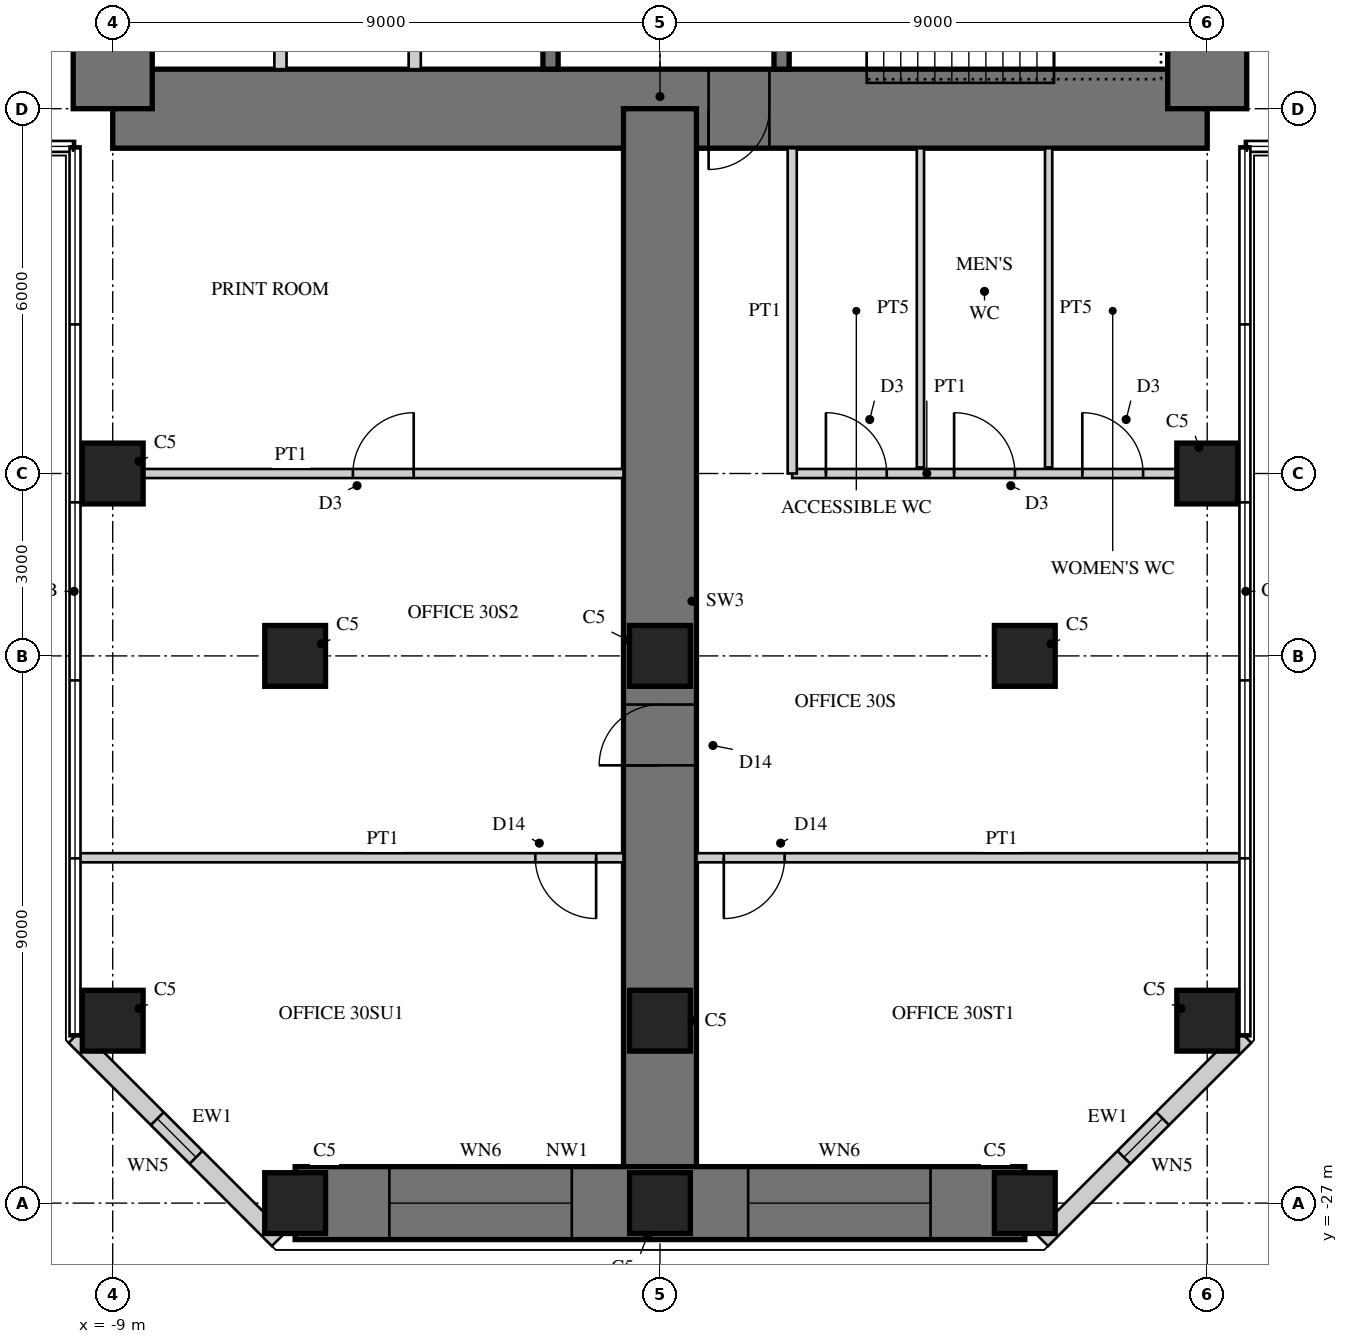
"""IFC4 building model, lengths in metres.
Left out: names, types, materials, properties, quantities, classifications, styles, units other than length and angle.
Written with IfcOpenShell. Run it as: python <this file> out.ifc"""

import sys

from ifc_helpers import new_model, si_unit, direction, frame, frame_2d, origin, origin_2d, place, context, subcontext, project, spatial, rectangle, hollow_rectangle, extrude, element, fill, save


model = new_model("IFC4")
c1 = context("Model", 3, precision=1e-05, world=origin(), true_north=direction((0.0, 1.0)))
c2 = subcontext(c1, "Body", "Model", "MODEL_VIEW")
j1 = project(units=[si_unit("LENGTHUNIT", "METRE"), si_unit("PLANEANGLEUNIT", "RADIAN")], contexts=[c1])
p1 = place(None, origin())
s1 = spatial("IfcSite", under=j1, at=p1, CompositionType="ELEMENT")
p2 = place(p1, origin())
s2 = spatial("IfcBuilding", under=s1, at=p2, CompositionType="ELEMENT")
p3 = place(p2, frame((0.0, 0.0, 124.5)))
s3 = spatial("IfcBuildingStorey", under=s2, at=p3, CompositionType="ELEMENT", Elevation=124.5)
p4 = place(p3, frame((-9.0, -9.0, 0.0), z_axis=(0.0, 0.0, 1.0), x_axis=(1.0, 0.0, 0.0)))
e1 = element("IfcWall", 1, at=p4, inside=s3, PredefinedType="SHEAR", context=c2, shape_type="SweptSolid", body=[
    extrude(rectangle(XDim=18.0, YDim=1.3, at=frame_2d((9.0, 0.0))), origin(), (0.0, 0.0, 1.0), 4.0),
])
p5 = place(p4, frame((9.8, 0.0, 0.0)))
e2 = element("IfcOpeningElement", 2, at=p5, cuts=e1, PredefinedType="OPENING", context=c2, shape_type="SweptSolid", body=[
    extrude(rectangle(XDim=1.0, YDim=2.4, at=frame_2d((0.5, 1.2))), frame((0.0, 0.66, 0.0), z_axis=(0.0, -1.0, 0.0), x_axis=(1.0, 0.0, 0.0)), (0.0, 0.0, 1.0), 1.32),
])
p6 = place(p3, frame((9.0, -9.0, 0.0), z_axis=(0.0, 0.0, 1.0), x_axis=(0.0, 1.0, 0.0)))
e3 = element("IfcWall", 3, at=p6, inside=s3, PredefinedType="SHEAR", context=c2, shape_type="SweptSolid", body=[
    extrude(rectangle(XDim=18.0, YDim=1.3, at=frame_2d((9.0, 0.0))), origin(), (0.0, 0.0, 1.0), 4.0),
])
p7 = place(p6, frame((9.8, 0.0, 0.0)))
e4 = element("IfcOpeningElement", 4, at=p7, cuts=e3, PredefinedType="OPENING", context=c2, shape_type="SweptSolid", body=[
    extrude(rectangle(XDim=1.0, YDim=2.4, at=frame_2d((0.5, 1.2))), frame((0.0, 0.66, 0.0), z_axis=(0.0, -1.0, 0.0), x_axis=(1.0, 0.0, 0.0)), (0.0, 0.0, 1.0), 1.32),
])
p8 = place(p3, frame((-9.0, 9.0, 0.0), z_axis=(0.0, 0.0, 1.0), x_axis=(0.0, -1.0, 0.0)))
e5 = element("IfcWall", 5, at=p8, inside=s3, PredefinedType="SHEAR", context=c2, shape_type="SweptSolid", body=[
    extrude(rectangle(XDim=18.0, YDim=1.3, at=frame_2d((9.0, 0.0))), origin(), (0.0, 0.0, 1.0), 4.0),
])
p9 = place(p8, frame((9.8, 0.0, 0.0)))
e6 = element("IfcOpeningElement", 6, at=p9, cuts=e5, PredefinedType="OPENING", context=c2, shape_type="SweptSolid", body=[
    extrude(rectangle(XDim=1.0, YDim=2.4, at=frame_2d((0.5, 1.2))), frame((0.0, 0.66, 0.0), z_axis=(0.0, -1.0, 0.0), x_axis=(1.0, 0.0, 0.0)), (0.0, 0.0, 1.0), 1.32),
])
p10 = place(p3, frame((-1.8, -1.875, 0.0), z_axis=(0.0, 0.0, 1.0), x_axis=(0.0, -1.0, 0.0)))
e7 = element("IfcWall", 7, at=p10, inside=s3, PredefinedType="SHEAR", context=c2, shape_type="SweptSolid", body=[
    extrude(rectangle(XDim=6.475, YDim=0.25, at=frame_2d((3.238, 0.0))), origin(), (0.0, 0.0, 1.0), 4.0),
])
p11 = place(p10, frame((1.875, 0.0, 0.0)))
e8 = element("IfcOpeningElement", 8, at=p11, cuts=e7, PredefinedType="OPENING", context=c2, shape_type="SweptSolid", body=[
    extrude(rectangle(XDim=1.6, YDim=2.4, at=frame_2d((0.8, 1.2))), frame((0.0, 0.135, 0.0), z_axis=(0.0, -1.0, 0.0), x_axis=(1.0, 0.0, 0.0)), (0.0, 0.0, 1.0), 0.27),
])
for number, where, z_axis, x_axis in (
    (9, (-4.033, -5.975, 0.0), (0.0, 0.0, 1.0), (0.0, -1.0, 0.0)),
    (10, (-6.242, -5.975, 0.0), (0.0, 0.0, 1.0), (0.0, -1.0, 0.0)),
):
    element("IfcWall", number, at=place(p3, frame(where, z_axis=z_axis, x_axis=x_axis)), inside=s3, PredefinedType="PARTITIONING", context=c2, shape_type="SweptSolid", body=[
        extrude(rectangle(XDim=2.375, YDim=0.2, at=frame_2d((1.188, 0.0))), origin(), (0.0, 0.0, 1.0), 4.0),
    ])
p12 = place(p3, frame((2.0, -1.675, 0.0), z_axis=(0.0, 0.0, 1.0), x_axis=(0.0, -1.0, 0.0)))
e11 = element("IfcWall", 11, at=p12, inside=s3, PredefinedType="SHEAR", context=c2, shape_type="SweptSolid", body=[
    extrude(rectangle(XDim=6.675, YDim=0.25, at=frame_2d((3.337, 0.0))), origin(), (0.0, 0.0, 1.0), 4.0),
])
p13 = place(p12, frame((0.725, 0.0, 0.0)))
e12 = element("IfcOpeningElement", 12, at=p13, cuts=e11, PredefinedType="OPENING", context=c2, shape_type="SweptSolid", body=[
    extrude(rectangle(XDim=1.0, YDim=2.1, at=frame_2d((0.5, 1.05))), frame((0.0, 0.135, 0.0), z_axis=(0.0, -1.0, 0.0), x_axis=(1.0, 0.0, 0.0)), (0.0, 0.0, 1.0), 0.27),
])
p14 = place(p3, frame((0.0, -9.0, 0.0), z_axis=(0.0, 0.0, 1.0), x_axis=(0.0, -1.0, 0.0)))
e13 = element("IfcWall", 13, at=p14, inside=s3, PredefinedType="SHEAR", context=c2, shape_type="SweptSolid", body=[
    extrude(rectangle(XDim=18.0, YDim=1.2, at=frame_2d((9.0, 0.0))), origin(), (0.0, 0.0, 1.0), 4.0),
])
p15 = place(p14, frame((9.8, 0.0, 0.0)))
e14 = element("IfcOpeningElement", 14, at=p15, cuts=e13, PredefinedType="OPENING", context=c2, shape_type="SweptSolid", body=[
    extrude(rectangle(XDim=1.0, YDim=2.2, at=frame_2d((0.5, 1.1))), frame((0.0, 0.61, 0.0), z_axis=(0.0, -1.0, 0.0), x_axis=(1.0, 0.0, 0.0)), (0.0, 0.0, 1.0), 1.22),
])
p16 = place(p3, frame((-6.0, -27.0, 0.0), z_axis=(0.0, 0.0, 1.0), x_axis=(1.0, 0.0, 0.0)))
e15 = element("IfcWall", 15, at=p16, inside=s3, PredefinedType="SHEAR", context=c2, shape_type="SweptSolid", body=[
    extrude(rectangle(XDim=12.0, YDim=1.2, at=frame_2d((6.0, 0.0))), origin(), (0.0, 0.0, 1.0), 4.0),
])
p17 = place(p16, frame((1.55, 0.0, 0.6)))
e16 = element("IfcOpeningElement", 16, at=p17, cuts=e15, PredefinedType="OPENING", context=c2, shape_type="SweptSolid", body=[
    extrude(rectangle(XDim=3.0, YDim=2.4, at=frame_2d((1.5, 1.2))), frame((0.0, 0.61, 0.0), z_axis=(0.0, -1.0, 0.0), x_axis=(1.0, 0.0, 0.0)), (0.0, 0.0, 1.0), 1.22),
])
p18 = place(p16, frame((7.45, 0.0, 0.6)))
e17 = element("IfcOpeningElement", 17, at=p18, cuts=e15, PredefinedType="OPENING", context=c2, shape_type="SweptSolid", body=[
    extrude(rectangle(XDim=3.0, YDim=2.4, at=frame_2d((1.5, 1.2))), frame((0.0, 0.61, 0.0), z_axis=(0.0, -1.0, 0.0), x_axis=(1.0, 0.0, 0.0)), (0.0, 0.0, 1.0), 1.22),
])
for number, where, z_axis, x_axis in (
    (18, (-9.0, -15.0, 0.0), (0.0, 0.0, 1.0), (1.0, 0.0, 0.0)),
    (19, (-9.0, -24.0, 0.0), (0.0, 0.0, 1.0), (1.0, 0.0, 0.0)),
    (20, (9.0, -15.0, 0.0), (0.0, 0.0, 1.0), (1.0, 0.0, 0.0)),
    (21, (9.0, -24.0, 0.0), (0.0, 0.0, 1.0), (1.0, 0.0, 0.0)),
    (22, (-6.0, -27.0, 0.0), (0.0, 0.0, 1.0), (1.0, 0.0, 0.0)),
    (23, (0.0, -27.0, 0.0), (0.0, 0.0, 1.0), (1.0, 0.0, 0.0)),
    (24, (6.0, -27.0, 0.0), (0.0, 0.0, 1.0), (1.0, 0.0, 0.0)),
    (25, (-6.0, -18.0, 0.0), (0.0, 0.0, 1.0), (1.0, 0.0, 0.0)),
    (26, (0.0, -18.0, 0.0), (0.0, 0.0, 1.0), (1.0, 0.0, 0.0)),
    (27, (6.0, -18.0, 0.0), (0.0, 0.0, 1.0), (1.0, 0.0, 0.0)),
    (28, (0.0, -24.0, 0.0), (0.0, 0.0, 1.0), (1.0, 0.0, 0.0)),
):
    element("IfcColumn", number, at=place(p3, frame(where, z_axis=z_axis, x_axis=x_axis)), inside=s3, PredefinedType="COLUMN", context=c2, shape_type="SweptSolid", body=[
        extrude(rectangle(XDim=1.0, YDim=1.0, at=origin_2d()), origin(), (0.0, 0.0, 1.0), 4.0),
    ])
p19 = place(p3, frame((-9.62, -24.257, 0.0), z_axis=(0.0, 0.0, 1.0), x_axis=(0.707106781187, -0.707106781187, 0.0)))
e29 = element("IfcWall", 29, at=p19, inside=s3, PredefinedType="SOLIDWALL", context=c2, shape_type="SweptSolid", body=[
    extrude(rectangle(XDim=4.728, YDim=0.3, at=frame_2d((2.364, 0.0))), origin(), (0.0, 0.0, 1.0), 3.8),
])
p20 = place(p19, frame((1.914, 0.0, 0.3)))
e30 = element("IfcOpeningElement", 30, at=p20, cuts=e29, PredefinedType="OPENING", context=c2, shape_type="SweptSolid", body=[
    extrude(rectangle(XDim=0.9, YDim=2.4, at=frame_2d((0.45, 1.2))), frame((0.0, 0.16, 0.0), z_axis=(0.0, -1.0, 0.0), x_axis=(1.0, 0.0, 0.0)), (0.0, 0.0, 1.0), 0.32),
])
p21 = place(p3, frame((6.277, -27.6, 0.0), z_axis=(0.0, 0.0, 1.0), x_axis=(0.707106781187, 0.707106781187, 0.0)))
e31 = element("IfcWall", 31, at=p21, inside=s3, PredefinedType="SOLIDWALL", context=c2, shape_type="SweptSolid", body=[
    extrude(rectangle(XDim=4.728, YDim=0.3, at=frame_2d((2.364, 0.0))), origin(), (0.0, 0.0, 1.0), 3.8),
])
p22 = place(p21, frame((1.914, 0.0, 0.3)))
e32 = element("IfcOpeningElement", 32, at=p22, cuts=e31, PredefinedType="OPENING", context=c2, shape_type="SweptSolid", body=[
    extrude(rectangle(XDim=0.9, YDim=2.4, at=frame_2d((0.45, 1.2))), frame((0.0, 0.16, 0.0), z_axis=(0.0, -1.0, 0.0), x_axis=(1.0, 0.0, 0.0)), (0.0, 0.0, 1.0), 0.32),
])
p23 = place(p3, frame((2.175, -15.0, 0.0), z_axis=(0.0, 0.0, 1.0), x_axis=(1.0, 0.0, 0.0)))
e33 = element("IfcWall", 33, at=p23, inside=s3, PredefinedType="PARTITIONING", context=c2, shape_type="SweptSolid", body=[
    extrude(rectangle(XDim=6.325, YDim=0.15, at=frame_2d((3.163, 0.0))), origin(), (0.0, 0.0, 1.0), 3.0),
])
p24 = place(p23, frame((0.554, 0.0, 0.0)))
e34 = element("IfcOpeningElement", 34, at=p24, cuts=e33, PredefinedType="OPENING", context=c2, shape_type="SweptSolid", body=[
    extrude(rectangle(XDim=1.0, YDim=2.1, at=frame_2d((0.5, 1.05))), frame((0.0, 0.085, 0.0), z_axis=(0.0, -1.0, 0.0), x_axis=(1.0, 0.0, 0.0)), (0.0, 0.0, 1.0), 0.17),
])
p25 = place(p23, frame((2.663, 0.0, 0.0)))
e35 = element("IfcOpeningElement", 35, at=p25, cuts=e33, PredefinedType="OPENING", context=c2, shape_type="SweptSolid", body=[
    extrude(rectangle(XDim=1.0, YDim=2.1, at=frame_2d((0.5, 1.05))), frame((0.0, 0.085, 0.0), z_axis=(0.0, -1.0, 0.0), x_axis=(1.0, 0.0, 0.0)), (0.0, 0.0, 1.0), 0.17),
])
p26 = place(p23, frame((4.771, 0.0, 0.0)))
e36 = element("IfcOpeningElement", 36, at=p26, cuts=e33, PredefinedType="OPENING", context=c2, shape_type="SweptSolid", body=[
    extrude(rectangle(XDim=1.0, YDim=2.1, at=frame_2d((0.5, 1.05))), frame((0.0, 0.085, 0.0), z_axis=(0.0, -1.0, 0.0), x_axis=(1.0, 0.0, 0.0)), (0.0, 0.0, 1.0), 0.17),
])
p27 = place(p3, frame((2.175, -9.65, 0.0), z_axis=(0.0, 0.0, 1.0), x_axis=(0.0, -1.0, 0.0)))
e37 = element("IfcWall", 37, at=p27, inside=s3, PredefinedType="PARTITIONING", context=c2, shape_type="SweptSolid", body=[
    extrude(rectangle(XDim=5.35, YDim=0.15, at=frame_2d((2.675, 0.0))), origin(), (0.0, 0.0, 1.0), 3.8),
])
for number, where, z_axis, x_axis in (
    (38, (4.283, -9.65, 0.0), (0.0, 0.0, 1.0), (0.0, -1.0, 0.0)),
    (39, (6.392, -9.65, 0.0), (0.0, 0.0, 1.0), (0.0, -1.0, 0.0)),
):
    element("IfcWall", number, at=place(p3, frame(where, z_axis=z_axis, x_axis=x_axis)), inside=s3, PredefinedType="PLUMBINGWALL", context=c2, shape_type="SweptSolid", body=[
        extrude(rectangle(XDim=5.25, YDim=0.12, at=frame_2d((2.625, 0.0))), origin(), (0.0, 0.0, 1.0), 3.8),
    ])
p28 = place(p3, frame((-8.5, -15.0, 0.0), z_axis=(0.0, 0.0, 1.0), x_axis=(1.0, 0.0, 0.0)))
e40 = element("IfcWall", 40, at=p28, inside=s3, PredefinedType="PARTITIONING", context=c2, shape_type="SweptSolid", body=[
    extrude(rectangle(XDim=7.9, YDim=0.15, at=frame_2d((3.95, 0.0))), origin(), (0.0, 0.0, 1.0), 3.0),
])
p29 = place(p28, frame((3.45, 0.0, 0.0)))
e41 = element("IfcOpeningElement", 41, at=p29, cuts=e40, PredefinedType="OPENING", context=c2, shape_type="SweptSolid", body=[
    extrude(rectangle(XDim=1.0, YDim=2.1, at=frame_2d((0.5, 1.05))), frame((0.0, 0.085, 0.0), z_axis=(0.0, -1.0, 0.0), x_axis=(1.0, 0.0, 0.0)), (0.0, 0.0, 1.0), 0.17),
])
p30 = place(p3, frame((0.6, -21.32, 0.0), z_axis=(0.0, 0.0, 1.0), x_axis=(1.0, 0.0, 0.0)))
e42 = element("IfcWall", 42, at=p30, inside=s3, PredefinedType="PARTITIONING", context=c2, shape_type="SweptSolid", body=[
    extrude(rectangle(XDim=8.98, YDim=0.15, at=frame_2d((4.49, 0.0))), origin(), (0.0, 0.0, 1.0), 3.8),
])
p31 = place(p30, frame((0.45, 0.0, 0.0)))
e43 = element("IfcOpeningElement", 43, at=p31, cuts=e42, PredefinedType="OPENING", context=c2, shape_type="SweptSolid", body=[
    extrude(rectangle(XDim=1.0, YDim=2.2, at=frame_2d((0.5, 1.1))), frame((0.0, 0.085, 0.0), z_axis=(0.0, -1.0, 0.0), x_axis=(1.0, 0.0, 0.0)), (0.0, 0.0, 1.0), 0.17),
])
p32 = place(p3, frame((-9.58, -21.32, 0.0), z_axis=(0.0, 0.0, 1.0), x_axis=(1.0, 0.0, 0.0)))
e44 = element("IfcWall", 44, at=p32, inside=s3, PredefinedType="PARTITIONING", context=c2, shape_type="SweptSolid", body=[
    extrude(rectangle(XDim=8.98, YDim=0.15, at=frame_2d((4.49, 0.0))), origin(), (0.0, 0.0, 1.0), 3.8),
])
p33 = place(p32, frame((7.53, 0.0, 0.0)))
e45 = element("IfcOpeningElement", 45, at=p33, cuts=e44, PredefinedType="OPENING", context=c2, shape_type="SweptSolid", body=[
    extrude(rectangle(XDim=1.0, YDim=2.2, at=frame_2d((0.5, 1.1))), frame((0.0, 0.085, 0.0), z_axis=(0.0, -1.0, 0.0), x_axis=(1.0, 0.0, 0.0)), (0.0, 0.0, 1.0), 0.17),
])
p34 = place(p20, origin())
e46 = element("IfcWindow", 46, at=p34, inside=s3, PartitioningType="SINGLE_PANEL", PredefinedType="WINDOW", context=c2, shape_type="SweptSolid", body=[
    extrude(hollow_rectangle(XDim=0.9, YDim=2.4, WallThickness=0.06, at=frame_2d((0.45, 1.2))), frame((0.0, 0.03, 0.0), z_axis=(0.0, -1.0, 0.0), x_axis=(1.0, 0.0, 0.0)), (0.0, 0.0, 1.0), 0.06),
    extrude(rectangle(XDim=0.779, YDim=2.279, at=frame_2d((0.45, 1.2))), frame((0.0, 0.03, 0.0), z_axis=(0.0, -1.0, 0.0), x_axis=(1.0, 0.0, 0.0)), (0.0, 0.0, 1.0), 0.06),
])
fill(e30, e46)
p35 = place(p17, origin())
e47 = element("IfcWindow", 47, at=p35, inside=s3, PartitioningType="SINGLE_PANEL", PredefinedType="WINDOW", context=c2, shape_type="SweptSolid", body=[
    extrude(hollow_rectangle(XDim=3.0, YDim=2.4, WallThickness=0.06, at=frame_2d((1.5, 1.2))), frame((0.0, 0.03, 0.0), z_axis=(0.0, -1.0, 0.0), x_axis=(1.0, 0.0, 0.0)), (0.0, 0.0, 1.0), 0.06),
    extrude(rectangle(XDim=2.879, YDim=2.279, at=frame_2d((1.5, 1.2))), frame((0.0, 0.03, 0.0), z_axis=(0.0, -1.0, 0.0), x_axis=(1.0, 0.0, 0.0)), (0.0, 0.0, 1.0), 0.06),
])
fill(e16, e47)
p36 = place(p18, origin())
e48 = element("IfcWindow", 48, at=p36, inside=s3, PartitioningType="SINGLE_PANEL", PredefinedType="WINDOW", context=c2, shape_type="SweptSolid", body=[
    extrude(hollow_rectangle(XDim=3.0, YDim=2.4, WallThickness=0.06, at=frame_2d((1.5, 1.2))), frame((0.0, 0.03, 0.0), z_axis=(0.0, -1.0, 0.0), x_axis=(1.0, 0.0, 0.0)), (0.0, 0.0, 1.0), 0.06),
    extrude(rectangle(XDim=2.879, YDim=2.279, at=frame_2d((1.5, 1.2))), frame((0.0, 0.03, 0.0), z_axis=(0.0, -1.0, 0.0), x_axis=(1.0, 0.0, 0.0)), (0.0, 0.0, 1.0), 0.06),
])
fill(e17, e48)
p37 = place(p22, origin())
e49 = element("IfcWindow", 49, at=p37, inside=s3, PartitioningType="SINGLE_PANEL", PredefinedType="WINDOW", context=c2, shape_type="SweptSolid", body=[
    extrude(hollow_rectangle(XDim=0.9, YDim=2.4, WallThickness=0.06, at=frame_2d((0.45, 1.2))), frame((0.0, 0.03, 0.0), z_axis=(0.0, -1.0, 0.0), x_axis=(1.0, 0.0, 0.0)), (0.0, 0.0, 1.0), 0.06),
    extrude(rectangle(XDim=0.779, YDim=2.279, at=frame_2d((0.45, 1.2))), frame((0.0, 0.03, 0.0), z_axis=(0.0, -1.0, 0.0), x_axis=(1.0, 0.0, 0.0)), (0.0, 0.0, 1.0), 0.06),
])
fill(e32, e49)
p38 = place(p24, origin())
e50 = element("IfcDoor", 50, at=p38, inside=s3, OperationType="SINGLE_SWING_LEFT", PredefinedType="DOOR", context=c2, shape_type="SweptSolid", body=[
    extrude(rectangle(XDim=1.0, YDim=2.1, at=frame_2d((0.5, 1.05))), frame((0.0, 0.025, 0.0), z_axis=(0.0, -1.0, 0.0), x_axis=(1.0, 0.0, 0.0)), (0.0, 0.0, 1.0), 0.05),
])
fill(e34, e50)
p39 = place(p25, origin())
e51 = element("IfcDoor", 51, at=p39, inside=s3, OperationType="SINGLE_SWING_LEFT", PredefinedType="DOOR", context=c2, shape_type="SweptSolid", body=[
    extrude(rectangle(XDim=1.0, YDim=2.1, at=frame_2d((0.5, 1.05))), frame((0.0, 0.025, 0.0), z_axis=(0.0, -1.0, 0.0), x_axis=(1.0, 0.0, 0.0)), (0.0, 0.0, 1.0), 0.05),
])
fill(e35, e51)
p40 = place(p26, origin())
e52 = element("IfcDoor", 52, at=p40, inside=s3, OperationType="SINGLE_SWING_LEFT", PredefinedType="DOOR", context=c2, shape_type="SweptSolid", body=[
    extrude(rectangle(XDim=1.0, YDim=2.1, at=frame_2d((0.5, 1.05))), frame((0.0, 0.025, 0.0), z_axis=(0.0, -1.0, 0.0), x_axis=(1.0, 0.0, 0.0)), (0.0, 0.0, 1.0), 0.05),
])
fill(e36, e52)
p41 = place(p29, origin())
e53 = element("IfcDoor", 53, at=p41, inside=s3, OperationType="SINGLE_SWING_RIGHT", PredefinedType="DOOR", context=c2, shape_type="SweptSolid", body=[
    extrude(rectangle(XDim=1.0, YDim=2.1, at=frame_2d((0.5, 1.05))), frame((0.0, 0.025, 0.0), z_axis=(0.0, -1.0, 0.0), x_axis=(1.0, 0.0, 0.0)), (0.0, 0.0, 1.0), 0.05),
])
fill(e41, e53)
p42 = place(p31, frame((1.0, 0.0, 0.0), z_axis=(0.0, 0.0, 1.0), x_axis=(-1.0, 0.0, 0.0)))
e54 = element("IfcDoor", 54, at=p42, inside=s3, OperationType="SINGLE_SWING_RIGHT", PredefinedType="DOOR", context=c2, shape_type="SweptSolid", body=[
    extrude(rectangle(XDim=1.0, YDim=2.2, at=frame_2d((0.5, 1.1))), frame((0.0, 0.025, 0.0), z_axis=(0.0, -1.0, 0.0), x_axis=(1.0, 0.0, 0.0)), (0.0, 0.0, 1.0), 0.05),
])
fill(e43, e54)
p43 = place(p33, frame((1.0, 0.0, 0.0), z_axis=(0.0, 0.0, 1.0), x_axis=(-1.0, 0.0, 0.0)))
e55 = element("IfcDoor", 55, at=p43, inside=s3, OperationType="SINGLE_SWING_LEFT", PredefinedType="DOOR", context=c2, shape_type="SweptSolid", body=[
    extrude(rectangle(XDim=1.0, YDim=2.2, at=frame_2d((0.5, 1.1))), frame((0.0, 0.025, 0.0), z_axis=(0.0, -1.0, 0.0), x_axis=(1.0, 0.0, 0.0)), (0.0, 0.0, 1.0), 0.05),
])
fill(e45, e55)
p44 = place(p15, frame((1.0, 0.0, 0.0), z_axis=(0.0, 0.0, 1.0), x_axis=(-1.0, 0.0, 0.0)))
e56 = element("IfcDoor", 56, at=p44, inside=s3, OperationType="SINGLE_SWING_LEFT", PredefinedType="DOOR", context=c2, shape_type="SweptSolid", body=[
    extrude(rectangle(XDim=1.0, YDim=2.2, at=frame_2d((0.5, 1.1))), frame((0.0, 0.025, 0.0), z_axis=(0.0, -1.0, 0.0), x_axis=(1.0, 0.0, 0.0)), (0.0, 0.0, 1.0), 0.05),
])
fill(e14, e56)
p45 = place(p5, frame((1.0, 0.0, 0.0), z_axis=(0.0, 0.0, 1.0), x_axis=(-1.0, 0.0, 0.0)))
e57 = element("IfcDoor", 57, at=p45, inside=s3, OperationType="SINGLE_SWING_RIGHT", PredefinedType="DOOR", context=c2, shape_type="SweptSolid", body=[
    extrude(rectangle(XDim=1.0, YDim=2.4, at=frame_2d((0.5, 1.2))), frame((0.0, -0.005, 0.0), z_axis=(0.0, -1.0, 0.0), x_axis=(1.0, 0.0, 0.0)), (0.0, 0.0, 1.0), 0.05),
])
fill(e2, e57)
save(model, sys.argv[1])
